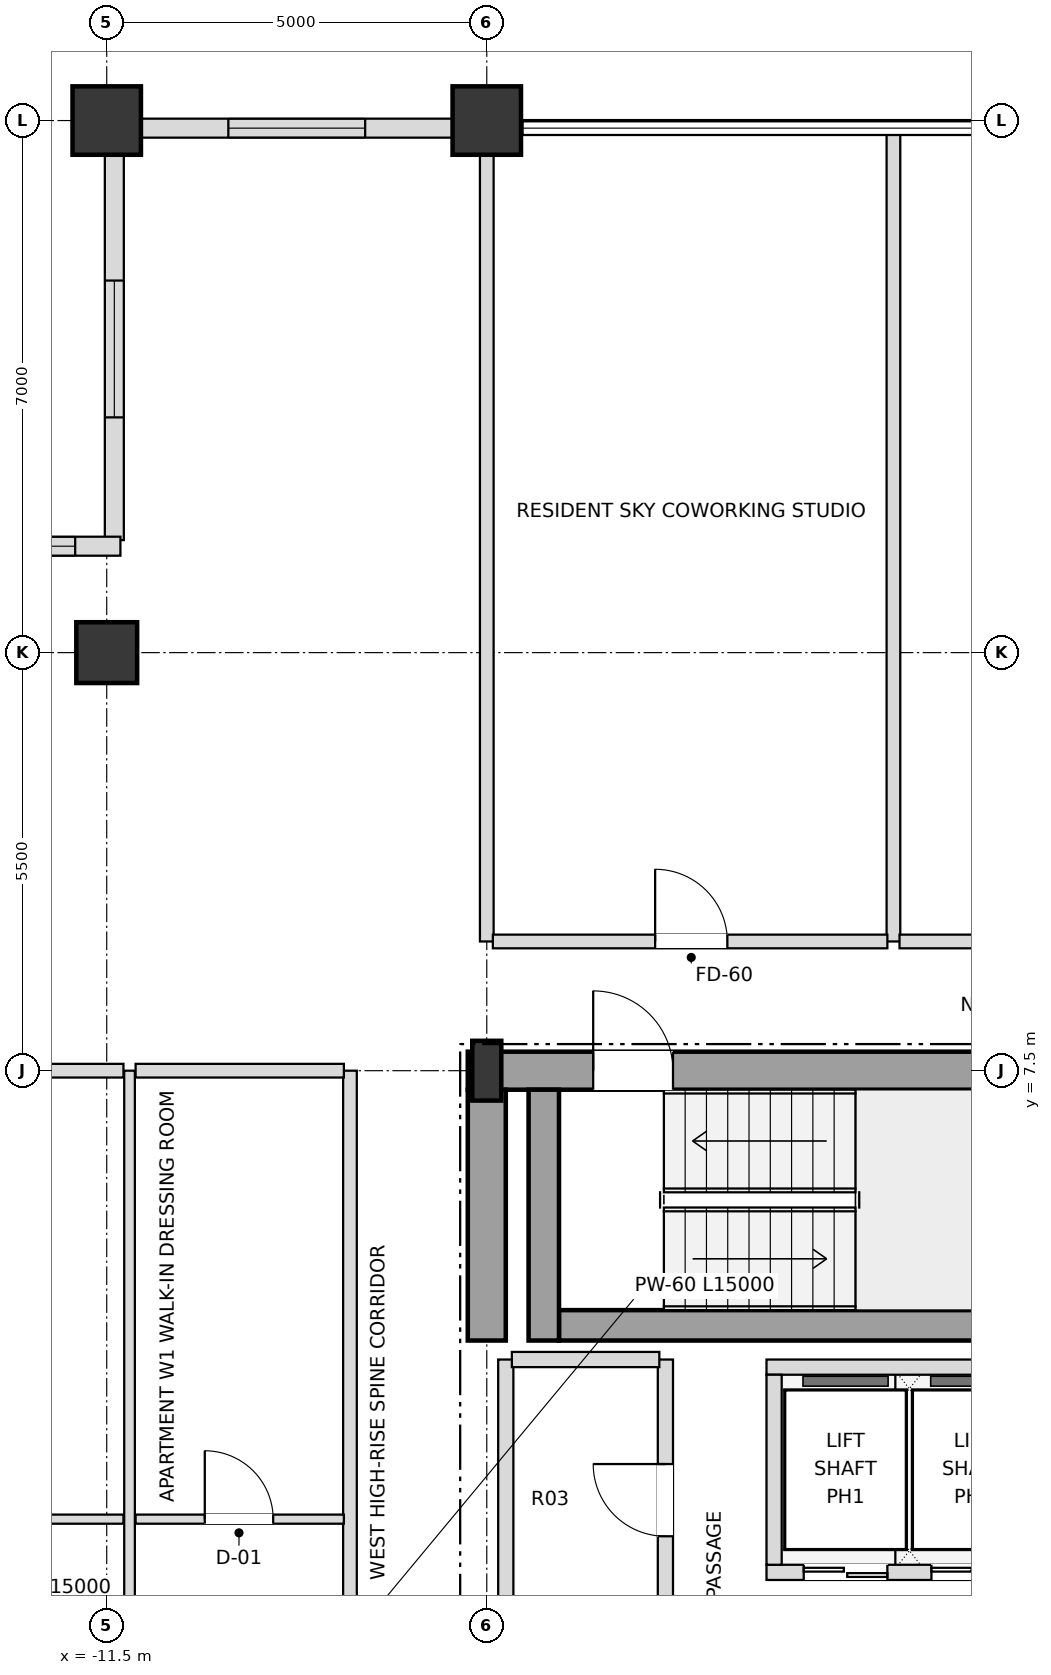
"""IFC4 building model, lengths in metres.
Left out: names, types, materials, properties, quantities, classifications, styles, units other than length and angle.
Written with IfcOpenShell. Run it as: python <this file> out.ifc"""

import sys

from ifc_helpers import new_model, si_unit, direction, frame, frame_2d, origin, origin_2d, place, context, subcontext, project, spatial, rectangle, i_section, extrude, element, fill, save


model = new_model("IFC4")
c1 = context("Model", 3, precision=1e-05, world=origin(), true_north=direction((0.0, 1.0)))
c2 = subcontext(c1, "Body", "Model", "MODEL_VIEW")
j1 = project(units=[si_unit("LENGTHUNIT", "METRE"), si_unit("PLANEANGLEUNIT", "RADIAN")], contexts=[c1])
p1 = place(None, origin())
s1 = spatial("IfcSite", under=j1, at=p1, CompositionType="ELEMENT")
p2 = place(p1, origin())
s2 = spatial("IfcBuilding", under=s1, at=p2, CompositionType="ELEMENT")
p3 = place(p2, frame((0.0, 0.0, 287.1)))
s3 = spatial("IfcBuildingStorey", under=s2, at=p3, CompositionType="ELEMENT", Elevation=287.1)
p4 = place(p3, frame((-6.5, 7.5, 0.0), z_axis=(0.0, 0.0, 1.0), x_axis=(1.0, 0.0, 0.0)))
e1 = element("IfcColumn", 1, at=p4, inside=s3, PredefinedType="COLUMN", context=c2, shape_type="SweptSolid", body=[
    extrude(i_section(OverallWidth=0.382, OverallDepth=0.786, WebThickness=0.02, FlangeThickness=0.033, at=origin_2d()), origin(), (0.0, 0.0, 1.0), 3.6),
])
for number, where, z_axis, x_axis in (
    (2, (-6.5, 20.0, 0.0), (0.0, 0.0, 1.0), (1.0, 0.0, 0.0)),
    (3, (-11.5, 20.0, 0.0), (0.0, 0.0, 1.0), (1.0, 0.0, 0.0)),
):
    element("IfcColumn", number, at=place(p3, frame(where, z_axis=z_axis, x_axis=x_axis)), inside=s3, PredefinedType="USERDEFINED", context=c2, shape_type="SweptSolid", body=[
        extrude(rectangle(XDim=0.9, YDim=0.9, at=origin_2d()), origin(), (0.0, 0.0, 1.0), 3.6),
    ])
p5 = place(p3, frame((-11.5, 13.0, 0.0), z_axis=(0.0, 0.0, 1.0), x_axis=(1.0, 0.0, 0.0)))
e4 = element("IfcColumn", 4, at=p5, inside=s3, PredefinedType="COLUMN", context=c2, shape_type="SweptSolid", body=[
    extrude(rectangle(XDim=0.8, YDim=0.8, at=origin_2d()), origin(), (0.0, 0.0, 1.0), 3.6),
])
p6 = place(p3, frame((-6.945, 19.9, 0.0), z_axis=(0.0, 0.0, 1.0), x_axis=(-1.0, 0.0, 0.0)))
e5 = element("IfcWall", 5, at=p6, inside=s3, PredefinedType="SOLIDWALL", context=c2, shape_type="SweptSolid", body=[
    extrude(rectangle(XDim=4.11, YDim=0.25, at=frame_2d((2.055, 0.0))), origin(), (0.0, 0.0, 1.0), 2.748),
])
p7 = place(p6, frame((1.155, 0.0, 0.72)))
e6 = element("IfcOpeningElement", 6, at=p7, cuts=e5, PredefinedType="OPENING", context=c2, shape_type="SweptSolid", body=[
    extrude(rectangle(XDim=1.8, YDim=1.68, at=frame_2d((0.9, 0.84))), frame((0.0, 0.135, 0.0), z_axis=(0.0, -1.0, 0.0), x_axis=(1.0, 0.0, 0.0)), (0.0, 0.0, 1.0), 0.27),
])
p8 = place(p3, frame((-11.4, 19.82, 0.0), z_axis=(0.0, 0.0, 1.0), x_axis=(0.0, -1.0, 0.0)))
e7 = element("IfcWall", 7, at=p8, inside=s3, PredefinedType="SOLIDWALL", context=c2, shape_type="SweptSolid", body=[
    extrude(rectangle(XDim=5.34, YDim=0.25, at=frame_2d((2.67, 0.0))), origin(), (0.0, 0.0, 1.0), 2.748),
])
p9 = place(p8, frame((1.925, 0.0, 0.72)))
e8 = element("IfcOpeningElement", 8, at=p9, cuts=e7, PredefinedType="OPENING", context=c2, shape_type="SweptSolid", body=[
    extrude(rectangle(XDim=1.8, YDim=1.68, at=frame_2d((0.9, 0.84))), frame((0.0, 0.135, 0.0), z_axis=(0.0, -1.0, 0.0), x_axis=(1.0, 0.0, 0.0)), (0.0, 0.0, 1.0), 0.27),
])
p10 = place(p3, frame((-11.32, 14.4, 0.0), z_axis=(0.0, 0.0, 1.0), x_axis=(-1.0, 0.0, 0.0)))
e9 = element("IfcWall", 9, at=p10, inside=s3, PredefinedType="SOLIDWALL", context=c2, shape_type="SweptSolid", body=[
    extrude(rectangle(XDim=5.66, YDim=0.25, at=frame_2d((2.83, 0.0))), origin(), (0.0, 0.0, 1.0), 2.748),
])
p11 = place(p10, frame((0.595, 0.0, 0.72)))
e10 = element("IfcOpeningElement", 10, at=p11, cuts=e9, PredefinedType="OPENING", context=c2, shape_type="SweptSolid", body=[
    extrude(rectangle(XDim=1.8, YDim=1.68, at=frame_2d((0.9, 0.84))), frame((0.0, 0.135, 0.0), z_axis=(0.0, -1.0, 0.0), x_axis=(1.0, 0.0, 0.0)), (0.0, 0.0, 1.0), 0.27),
])
p12 = place(p10, frame((3.265, 0.0, 0.72)))
e11 = element("IfcOpeningElement", 11, at=p12, cuts=e9, PredefinedType="OPENING", context=c2, shape_type="SweptSolid", body=[
    extrude(rectangle(XDim=1.8, YDim=1.68, at=frame_2d((0.9, 0.84))), frame((0.0, 0.135, 0.0), z_axis=(0.0, -1.0, 0.0), x_axis=(1.0, 0.0, 0.0)), (0.0, 0.0, 1.0), 0.27),
])
p13 = place(p3, frame((-6.75, 7.5, 0.0), z_axis=(0.0, 0.0, 1.0), x_axis=(1.0, 0.0, 0.0)))
e12 = element("IfcWall", 12, at=p13, inside=s3, PredefinedType="SHEAR", context=c2, shape_type="SweptSolid", body=[
    extrude(rectangle(XDim=6.75, YDim=0.5, at=frame_2d((3.375, 0.0))), origin(), (0.0, 0.0, 1.0), 3.38),
])
p14 = place(p13, frame((1.65, 0.0, 0.0)))
e13 = element("IfcOpeningElement", 13, at=p14, cuts=e12, PredefinedType="OPENING", context=c2, shape_type="SweptSolid", body=[
    extrude(rectangle(XDim=1.05, YDim=2.15, at=frame_2d((0.525, 1.075))), frame((0.0, 0.26, 0.0), z_axis=(0.0, -1.0, 0.0), x_axis=(1.0, 0.0, 0.0)), (0.0, 0.0, 1.0), 0.52),
])
p15 = place(p3, frame((-6.5, 3.95, 0.0), z_axis=(0.0, 0.0, 1.0), x_axis=(0.0, 1.0, 0.0)))
e14 = element("IfcWall", 14, at=p15, inside=s3, PredefinedType="SHEAR", context=c2, shape_type="SweptSolid", body=[
    extrude(rectangle(XDim=3.3, YDim=0.5, at=frame_2d((1.65, 0.0))), origin(), (0.0, 0.0, 1.0), 3.38),
])
p16 = place(p3, frame((-5.55, 4.15, 0.0), z_axis=(0.0, 0.0, 1.0), x_axis=(1.0, 0.0, 0.0)))
e15 = element("IfcWall", 15, at=p16, inside=s3, PredefinedType="SHEAR", context=c2, shape_type="SweptSolid", body=[
    extrude(rectangle(XDim=7.08, YDim=0.4, at=frame_2d((3.54, 0.0))), origin(), (0.0, 0.0, 1.0), 3.38),
])
p17 = place(p3, frame((-5.75, 3.95, 0.0), z_axis=(0.0, 0.0, 1.0), x_axis=(0.0, 1.0, 0.0)))
e16 = element("IfcWall", 16, at=p17, inside=s3, PredefinedType="SHEAR", context=c2, shape_type="SweptSolid", body=[
    extrude(rectangle(XDim=3.3, YDim=0.4, at=frame_2d((1.65, 0.0))), origin(), (0.0, 0.0, 1.0), 3.38),
])
p18 = place(p3, frame((-2.82, 0.9, 0.0), z_axis=(0.0, 0.0, 1.0), x_axis=(1.0, 0.0, 0.0)))
e17 = element("IfcWall", 17, at=p18, inside=s3, PredefinedType="SOLIDWALL", context=c2, shape_type="SweptSolid", body=[
    extrude(rectangle(XDim=5.58, YDim=0.2, at=frame_2d((2.79, 0.0))), origin(), (0.0, 0.0, 1.0), 3.38),
])
p19 = place(p18, frame((0.49, 0.0, 0.0)))
e18 = element("IfcOpeningElement", 18, at=p19, cuts=e17, PredefinedType="OPENING", context=c2, shape_type="SweptSolid", body=[
    extrude(rectangle(XDim=1.1, YDim=2.15, at=frame_2d((0.55, 1.075))), frame((0.0, 0.11, 0.0), z_axis=(0.0, -1.0, 0.0), x_axis=(1.0, 0.0, 0.0)), (0.0, 0.0, 1.0), 0.22),
])
p20 = place(p18, frame((2.17, 0.0, 0.0)))
e19 = element("IfcOpeningElement", 19, at=p20, cuts=e17, PredefinedType="OPENING", context=c2, shape_type="SweptSolid", body=[
    extrude(rectangle(XDim=1.1, YDim=2.15, at=frame_2d((0.55, 1.075))), frame((0.0, 0.11, 0.0), z_axis=(0.0, -1.0, 0.0), x_axis=(1.0, 0.0, 0.0)), (0.0, 0.0, 1.0), 0.22),
])
p21 = place(p18, frame((3.86, 0.0, 0.0)))
e20 = element("IfcOpeningElement", 20, at=p21, cuts=e17, PredefinedType="OPENING", context=c2, shape_type="SweptSolid", body=[
    extrude(rectangle(XDim=1.2, YDim=2.2, at=frame_2d((0.6, 1.1))), frame((0.0, 0.11, 0.0), z_axis=(0.0, -1.0, 0.0), x_axis=(1.0, 0.0, 0.0)), (0.0, 0.0, 1.0), 0.22),
])
p22 = place(p3, frame((-2.82, 3.6, 0.0), z_axis=(0.0, 0.0, 1.0), x_axis=(1.0, 0.0, 0.0)))
e21 = element("IfcWall", 21, at=p22, inside=s3, PredefinedType="SOLIDWALL", context=c2, shape_type="SweptSolid", body=[
    extrude(rectangle(XDim=5.58, YDim=0.2, at=frame_2d((2.79, 0.0))), origin(), (0.0, 0.0, 1.0), 3.38),
])
p23 = place(p3, frame((-2.72, 1.0, 0.0), z_axis=(0.0, 0.0, 1.0), x_axis=(0.0, 1.0, 0.0)))
e22 = element("IfcWall", 22, at=p23, inside=s3, PredefinedType="SOLIDWALL", context=c2, shape_type="SweptSolid", body=[
    extrude(rectangle(XDim=2.5, YDim=0.2, at=frame_2d((1.25, 0.0))), origin(), (0.0, 0.0, 1.0), 3.38),
])
p24 = place(p3, frame((-11.2, -7.5, 0.0), z_axis=(0.0, 0.0, 1.0), x_axis=(0.0, 1.0, 0.0)))
e23 = element("IfcWall", 23, at=p24, inside=s3, PredefinedType="PARTITIONING", context=c2, shape_type="SweptSolid", body=[
    extrude(rectangle(XDim=15.0, YDim=0.14, at=frame_2d((7.5, 0.0))), origin(), (0.0, 0.0, 1.0), 3.38),
])
p25 = place(p24, frame((3.475, 0.0, 0.0)))
e24 = element("IfcOpeningElement", 24, at=p25, cuts=e23, PredefinedType="OPENING", context=c2, shape_type="SweptSolid", body=[
    extrude(rectangle(XDim=0.95, YDim=2.1, at=frame_2d((0.475, 1.05))), frame((0.0, 0.08, 0.0), z_axis=(0.0, -1.0, 0.0), x_axis=(1.0, 0.0, 0.0)), (0.0, 0.0, 1.0), 0.16),
])
p26 = place(p3, frame((-8.3, -7.5, 0.0), z_axis=(0.0, 0.0, 1.0), x_axis=(0.0, 1.0, 0.0)))
e25 = element("IfcWall", 25, at=p26, inside=s3, PredefinedType="PARTITIONING", context=c2, shape_type="SweptSolid", body=[
    extrude(rectangle(XDim=15.0, YDim=0.18, at=frame_2d((7.5, 0.0))), origin(), (0.0, 0.0, 1.0), 3.38),
])
p27 = place(p26, frame((3.475, 0.0, 0.0)))
e26 = element("IfcOpeningElement", 26, at=p27, cuts=e25, PredefinedType="OPENING", context=c2, shape_type="SweptSolid", body=[
    extrude(rectangle(XDim=0.95, YDim=2.15, at=frame_2d((0.475, 1.075))), frame((0.0, 0.1, 0.0), z_axis=(0.0, -1.0, 0.0), x_axis=(1.0, 0.0, 0.0)), (0.0, 0.0, 1.0), 0.2),
])
p28 = place(p3, frame((-6.5, 9.2, 0.0), z_axis=(0.0, 0.0, 1.0), x_axis=(0.0, 1.0, 0.0)))
e27 = element("IfcWall", 27, at=p28, inside=s3, PredefinedType="PARTITIONING", context=c2, shape_type="SweptSolid", body=[
    extrude(rectangle(XDim=10.7, YDim=0.18, at=frame_2d((5.35, 0.0))), origin(), (0.0, 0.0, 1.0), 2.826),
])
p29 = place(p3, frame((-6.25, -3.64, 0.0), z_axis=(0.0, 0.0, 1.0), x_axis=(0.0, 1.0, 0.0)))
e28 = element("IfcWall", 28, at=p29, inside=s3, PredefinedType="SOLIDWALL", context=c2, shape_type="SweptSolid", body=[
    extrude(rectangle(XDim=7.34, YDim=0.2, at=frame_2d((3.67, 0.0))), origin(), (0.0, 0.0, 1.0), 3.38),
])
p30 = place(p3, frame((-4.15, -3.7, 0.0), z_axis=(0.0, 0.0, 1.0), x_axis=(0.0, 1.0, 0.0)))
e29 = element("IfcWall", 29, at=p30, inside=s3, PredefinedType="SOLIDWALL", context=c2, shape_type="SweptSolid", body=[
    extrude(rectangle(XDim=7.4, YDim=0.2, at=frame_2d((3.7, 0.0))), origin(), (0.0, 0.0, 1.0), 3.38),
])
p31 = place(p30, frame((1.375, 0.0, 0.0)))
e30 = element("IfcOpeningElement", 30, at=p31, cuts=e29, PredefinedType="OPENING", context=c2, shape_type="SweptSolid", body=[
    extrude(rectangle(XDim=0.95, YDim=2.15, at=frame_2d((0.475, 1.075))), frame((0.0, 0.11, 0.0), z_axis=(0.0, -1.0, 0.0), x_axis=(1.0, 0.0, 0.0)), (0.0, 0.0, 1.0), 0.22),
])
p32 = place(p30, frame((5.075, 0.0, 0.0)))
e31 = element("IfcOpeningElement", 31, at=p32, cuts=e29, PredefinedType="OPENING", context=c2, shape_type="SweptSolid", body=[
    extrude(rectangle(XDim=0.95, YDim=2.15, at=frame_2d((0.475, 1.075))), frame((0.0, 0.11, 0.0), z_axis=(0.0, -1.0, 0.0), x_axis=(1.0, 0.0, 0.0)), (0.0, 0.0, 1.0), 0.22),
])
p33 = place(p3, frame((-1.15, 9.2, 0.0), z_axis=(0.0, 0.0, 1.0), x_axis=(0.0, 1.0, 0.0)))
e32 = element("IfcWall", 32, at=p33, inside=s3, PredefinedType="PARTITIONING", context=c2, shape_type="SweptSolid", body=[
    extrude(rectangle(XDim=10.7, YDim=0.18, at=frame_2d((5.35, 0.0))), origin(), (0.0, 0.0, 1.0), 3.018),
])
p34 = place(p3, frame((-16.82, 1.6, 0.0), z_axis=(0.0, 0.0, 1.0), x_axis=(1.0, 0.0, 0.0)))
e33 = element("IfcWall", 33, at=p34, inside=s3, PredefinedType="PARTITIONING", context=c2, shape_type="SweptSolid", body=[
    extrude(rectangle(XDim=5.54, YDim=0.12, at=frame_2d((2.77, 0.0))), origin(), (0.0, 0.0, 1.0), 3.018),
])
p35 = place(p34, frame((2.31, 0.0, 0.0)))
e34 = element("IfcOpeningElement", 34, at=p35, cuts=e33, PredefinedType="OPENING", context=c2, shape_type="SweptSolid", body=[
    extrude(rectangle(XDim=0.9, YDim=2.1, at=frame_2d((0.45, 1.05))), frame((0.0, 0.07, 0.0), z_axis=(0.0, -1.0, 0.0), x_axis=(1.0, 0.0, 0.0)), (0.0, 0.0, 1.0), 0.14),
])
p36 = place(p3, frame((-11.12, 1.6, 0.0), z_axis=(0.0, 0.0, 1.0), x_axis=(1.0, 0.0, 0.0)))
e35 = element("IfcWall", 35, at=p36, inside=s3, PredefinedType="PARTITIONING", context=c2, shape_type="SweptSolid", body=[
    extrude(rectangle(XDim=2.74, YDim=0.12, at=frame_2d((1.37, 0.0))), origin(), (0.0, 0.0, 1.0), 3.38),
])
p37 = place(p36, frame((0.91, 0.0, 0.0)))
e36 = element("IfcOpeningElement", 36, at=p37, cuts=e35, PredefinedType="OPENING", context=c2, shape_type="SweptSolid", body=[
    extrude(rectangle(XDim=0.9, YDim=2.1, at=frame_2d((0.45, 1.05))), frame((0.0, 0.07, 0.0), z_axis=(0.0, -1.0, 0.0), x_axis=(1.0, 0.0, 0.0)), (0.0, 0.0, 1.0), 0.14),
])
p38 = place(p3, frame((-6.17, 3.7, 0.0), z_axis=(0.0, 0.0, 1.0), x_axis=(1.0, 0.0, 0.0)))
e37 = element("IfcWall", 37, at=p38, inside=s3, PredefinedType="SOLIDWALL", context=c2, shape_type="SweptSolid", body=[
    extrude(rectangle(XDim=1.94, YDim=0.2, at=frame_2d((0.97, 0.0))), origin(), (0.0, 0.0, 1.0), 3.38),
])
p39 = place(p3, frame((-16.9, 7.5, 0.0), z_axis=(0.0, 0.0, 1.0), x_axis=(1.0, 0.0, 0.0)))
e38 = element("IfcWall", 38, at=p39, inside=s3, PredefinedType="PARTITIONING", context=c2, shape_type="SweptSolid", body=[
    extrude(rectangle(XDim=5.62, YDim=0.18, at=frame_2d((2.81, 0.0))), origin(), (0.0, 0.0, 1.0), 2.826),
])
p40 = place(p3, frame((-11.12, 7.5, 0.0), z_axis=(0.0, 0.0, 1.0), x_axis=(1.0, 0.0, 0.0)))
e39 = element("IfcWall", 39, at=p40, inside=s3, PredefinedType="PARTITIONING", context=c2, shape_type="SweptSolid", body=[
    extrude(rectangle(XDim=2.74, YDim=0.18, at=frame_2d((1.37, 0.0))), origin(), (0.0, 0.0, 1.0), 2.826),
])
p41 = place(p3, frame((-6.42, 9.2, 0.0), z_axis=(0.0, 0.0, 1.0), x_axis=(1.0, 0.0, 0.0)))
e40 = element("IfcWall", 40, at=p41, inside=s3, PredefinedType="PARTITIONING", context=c2, shape_type="SweptSolid", body=[
    extrude(rectangle(XDim=5.19, YDim=0.18, at=frame_2d((2.595, 0.0))), origin(), (0.0, 0.0, 1.0), 3.38),
])
p42 = place(p41, frame((2.135, 0.0, 0.0)))
e41 = element("IfcOpeningElement", 41, at=p42, cuts=e40, PredefinedType="OPENING", context=c2, shape_type="SweptSolid", body=[
    extrude(rectangle(XDim=0.95, YDim=2.15, at=frame_2d((0.475, 1.075))), frame((0.0, 0.1, 0.0), z_axis=(0.0, -1.0, 0.0), x_axis=(1.0, 0.0, 0.0)), (0.0, 0.0, 1.0), 0.2),
])
p43 = place(p3, frame((-1.07, 9.2, 0.0), z_axis=(0.0, 0.0, 1.0), x_axis=(1.0, 0.0, 0.0)))
e42 = element("IfcWall", 42, at=p43, inside=s3, PredefinedType="PARTITIONING", context=c2, shape_type="SweptSolid", body=[
    extrude(rectangle(XDim=9.79, YDim=0.18, at=frame_2d((4.895, 0.0))), origin(), (0.0, 0.0, 1.0), 2.826),
])
p44 = place(p43, frame((4.435, 0.0, 0.0)))
e43 = element("IfcOpeningElement", 43, at=p44, cuts=e42, PredefinedType="OPENING", context=c2, shape_type="SweptSolid", body=[
    extrude(rectangle(XDim=0.95, YDim=2.15, at=frame_2d((0.475, 1.075))), frame((0.0, 0.1, 0.0), z_axis=(0.0, -1.0, 0.0), x_axis=(1.0, 0.0, 0.0)), (0.0, 0.0, 1.0), 0.2),
])
p45 = place(p7, origin())
e44 = element("IfcWindow", 44, at=p45, inside=s3, PartitioningType="SINGLE_PANEL", PredefinedType="WINDOW", context=c2, shape_type="SweptSolid", body=[
    extrude(rectangle(XDim=1.8, YDim=1.68, at=frame_2d((0.9, 0.84))), frame((0.0, 0.03, 0.0), z_axis=(0.0, -1.0, 0.0), x_axis=(1.0, 0.0, 0.0)), (0.0, 0.0, 1.0), 0.06),
])
fill(e6, e44)
p46 = place(p9, origin())
e45 = element("IfcWindow", 45, at=p46, inside=s3, PartitioningType="SINGLE_PANEL", PredefinedType="WINDOW", context=c2, shape_type="SweptSolid", body=[
    extrude(rectangle(XDim=1.8, YDim=1.68, at=frame_2d((0.9, 0.84))), frame((0.0, 0.03, 0.0), z_axis=(0.0, -1.0, 0.0), x_axis=(1.0, 0.0, 0.0)), (0.0, 0.0, 1.0), 0.06),
])
fill(e8, e45)
p47 = place(p11, origin())
e46 = element("IfcWindow", 46, at=p47, inside=s3, PartitioningType="SINGLE_PANEL", PredefinedType="WINDOW", context=c2, shape_type="SweptSolid", body=[
    extrude(rectangle(XDim=1.8, YDim=1.68, at=frame_2d((0.9, 0.84))), frame((0.0, 0.03, 0.0), z_axis=(0.0, -1.0, 0.0), x_axis=(1.0, 0.0, 0.0)), (0.0, 0.0, 1.0), 0.06),
])
fill(e10, e46)
p48 = place(p14, origin())
e47 = element("IfcDoor", 47, at=p48, inside=s3, OperationType="SINGLE_SWING_LEFT", PredefinedType="DOOR", context=c2, shape_type="SweptSolid", body=[
    extrude(rectangle(XDim=1.05, YDim=2.15, at=frame_2d((0.525, 1.075))), frame((0.0, 0.025, 0.0), z_axis=(0.0, -1.0, 0.0), x_axis=(1.0, 0.0, 0.0)), (0.0, 0.0, 1.0), 0.05),
])
fill(e13, e47)
p49 = place(p19, origin())
e48 = element("IfcDoor", 48, at=p49, inside=s3, OperationType="DOUBLE_DOOR_SLIDING", PredefinedType="DOOR", context=c2, shape_type="SweptSolid", body=[
    extrude(rectangle(XDim=1.1, YDim=2.15, at=frame_2d((0.55, 1.075))), frame((0.0, 0.025, 0.0), z_axis=(0.0, -1.0, 0.0), x_axis=(1.0, 0.0, 0.0)), (0.0, 0.0, 1.0), 0.05),
])
fill(e18, e48)
p50 = place(p20, origin())
e49 = element("IfcDoor", 49, at=p50, inside=s3, OperationType="DOUBLE_DOOR_SLIDING", PredefinedType="DOOR", context=c2, shape_type="SweptSolid", body=[
    extrude(rectangle(XDim=1.1, YDim=2.15, at=frame_2d((0.55, 1.075))), frame((0.0, 0.025, 0.0), z_axis=(0.0, -1.0, 0.0), x_axis=(1.0, 0.0, 0.0)), (0.0, 0.0, 1.0), 0.05),
])
fill(e19, e49)
p51 = place(p32, origin())
e50 = element("IfcDoor", 50, at=p51, inside=s3, OperationType="SINGLE_SWING_RIGHT", PredefinedType="DOOR", context=c2, shape_type="SweptSolid", body=[
    extrude(rectangle(XDim=0.95, YDim=2.15, at=frame_2d((0.475, 1.075))), frame((0.0, 0.025, 0.0), z_axis=(0.0, -1.0, 0.0), x_axis=(1.0, 0.0, 0.0)), (0.0, 0.0, 1.0), 0.05),
])
fill(e31, e50)
p52 = place(p42, origin())
e51 = element("IfcDoor", 51, at=p52, inside=s3, OperationType="SINGLE_SWING_LEFT", PredefinedType="DOOR", context=c2, shape_type="SweptSolid", body=[
    extrude(rectangle(XDim=0.95, YDim=2.15, at=frame_2d((0.475, 1.075))), frame((0.0, 0.025, 0.0), z_axis=(0.0, -1.0, 0.0), x_axis=(1.0, 0.0, 0.0)), (0.0, 0.0, 1.0), 0.05),
])
fill(e41, e51)
p53 = place(p37, origin())
e52 = element("IfcDoor", 52, at=p53, inside=s3, OperationType="SINGLE_SWING_LEFT", PredefinedType="DOOR", context=c2, shape_type="SweptSolid", body=[
    extrude(rectangle(XDim=0.9, YDim=2.1, at=frame_2d((0.45, 1.05))), frame((0.0, 0.025, 0.0), z_axis=(0.0, -1.0, 0.0), x_axis=(1.0, 0.0, 0.0)), (0.0, 0.0, 1.0), 0.05),
])
fill(e36, e52)
save(model, sys.argv[1])
